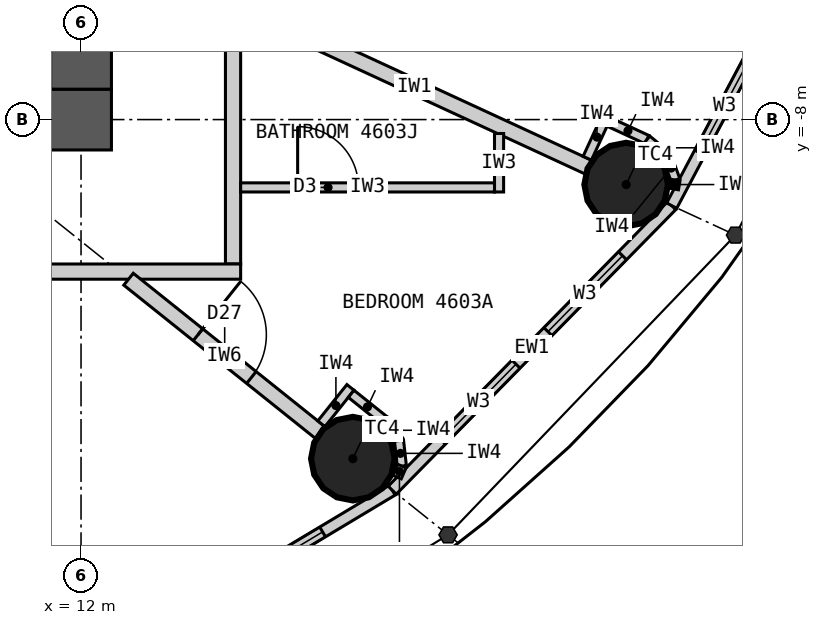
"""IFC4 building model, lengths in metres.
Left out: names, types, materials, properties, quantities, classifications, styles, units other than length and angle.
Written with IfcOpenShell. Run it as: python <this file> out.ifc"""

import sys

from ifc_helpers import new_model, si_unit, direction, frame, frame_2d, origin, origin_2d, place, context, subcontext, project, spatial, rectangle, circle, extrude, element, fill, save


model = new_model("IFC4")
c1 = context("Model", 3, precision=1e-05, world=origin(), true_north=direction((0.0, 1.0)))
c2 = subcontext(c1, "Body", "Model", "MODEL_VIEW")
j1 = project(units=[si_unit("LENGTHUNIT", "METRE"), si_unit("PLANEANGLEUNIT", "RADIAN")], contexts=[c1])
p1 = place(None, origin())
s1 = spatial("IfcSite", under=j1, at=p1, CompositionType="ELEMENT")
p2 = place(p1, origin())
s2 = spatial("IfcBuilding", under=s1, at=p2, CompositionType="ELEMENT")
p3 = place(p2, frame((0.0, 0.0, 173.1)))
s3 = spatial("IfcBuildingStorey", under=s2, at=p3, CompositionType="ELEMENT", Elevation=173.1)
for number, where, z_axis, x_axis in (
    (1, (15.576, -12.461, 0.0), (0.0, 0.0, 1.0), (1.0, 0.0, 0.0)),
    (2, (19.172, -8.855, 0.0), (0.0, 0.0, 1.0), (1.0, 0.0, 0.0)),
):
    element("IfcColumn", number, at=place(p3, frame(where, z_axis=z_axis, x_axis=x_axis)), inside=s3, PredefinedType="COLUMN", context=c2, shape_type="SweptSolid", body=[
        extrude(circle(Radius=0.55, at=origin_2d()), origin(), (0.0, 0.0, 1.0), 3.3),
    ])
p4 = place(p3, frame((12.4, -8.0, 0.0), z_axis=(0.0, 0.0, 1.0), x_axis=(-1.0, 0.0, 0.0)))
e3 = element("IfcWall", 3, at=p4, inside=s3, PredefinedType="SHEAR", context=c2, shape_type="SweptSolid", body=[
    extrude(rectangle(XDim=24.8, YDim=0.8, at=frame_2d((12.4, 0.0))), origin(), (0.0, 0.0, 1.0), 3.3),
])
p5 = place(p4, frame((11.1, 0.0, 0.0)))
e4 = element("IfcOpeningElement", 4, at=p5, cuts=e3, PredefinedType="OPENING", context=c2, shape_type="SweptSolid", body=[
    extrude(rectangle(XDim=1.2, YDim=2.2, at=frame_2d((0.6, 1.1))), frame((0.0, 0.41, 0.0), z_axis=(0.0, -1.0, 0.0), x_axis=(1.0, 0.0, 0.0)), (0.0, 0.0, 1.0), 0.82),
])
p6 = place(p4, frame((18.7, 0.0, 0.0)))
e5 = element("IfcOpeningElement", 5, at=p6, cuts=e3, PredefinedType="OPENING", context=c2, shape_type="SweptSolid", body=[
    extrude(rectangle(XDim=0.9, YDim=2.2, at=frame_2d((0.45, 1.1))), frame((0.0, 0.41, 0.0), z_axis=(0.0, -1.0, 0.0), x_axis=(1.0, 0.0, 0.0)), (0.0, 0.0, 1.0), 0.82),
])
p7 = place(p3, frame((12.0, -7.6, 0.0), z_axis=(0.0, 0.0, 1.0), x_axis=(0.0, 1.0, 0.0)))
e6 = element("IfcWall", 6, at=p7, inside=s3, PredefinedType="SHEAR", context=c2, shape_type="SweptSolid", body=[
    extrude(rectangle(XDim=15.2, YDim=0.8, at=frame_2d((7.6, 0.0))), origin(), (0.0, 0.0, 1.0), 3.3),
])
p8 = place(p7, frame((6.7, 0.0, 0.0)))
e7 = element("IfcOpeningElement", 7, at=p8, cuts=e6, PredefinedType="OPENING", context=c2, shape_type="SweptSolid", body=[
    extrude(rectangle(XDim=1.8, YDim=2.2, at=frame_2d((0.9, 1.1))), frame((0.0, 0.41, 0.0), z_axis=(0.0, -1.0, 0.0), x_axis=(1.0, 0.0, 0.0)), (0.0, 0.0, 1.0), 0.82),
])
p9 = place(p3, frame((11.346, -15.722, 0.0), z_axis=(0.0, 0.0, 1.0), x_axis=(0.857695199231, 0.514158482587, 0.0)))
e8 = element("IfcWall", 8, at=p9, inside=s3, PredefinedType="ELEMENTEDWALL", context=c2, shape_type="SweptSolid", body=[
    extrude(rectangle(XDim=5.536, YDim=0.15, at=frame_2d((2.768, 0.0))), origin(), (0.0, 0.0, 1.0), 3.12),
])
p10 = place(p9, frame((1.068, 0.0, 0.9)))
e9 = element("IfcOpeningElement", 9, at=p10, cuts=e8, PredefinedType="OPENING", context=c2, shape_type="SweptSolid", body=[
    extrude(rectangle(XDim=1.4, YDim=1.9, at=frame_2d((0.7, 0.95))), frame((0.0, 0.085, 0.0), z_axis=(0.0, -1.0, 0.0), x_axis=(1.0, 0.0, 0.0)), (0.0, 0.0, 1.0), 0.17),
])
p11 = place(p9, frame((3.068, 0.0, 0.9)))
e10 = element("IfcOpeningElement", 10, at=p11, cuts=e8, PredefinedType="OPENING", context=c2, shape_type="SweptSolid", body=[
    extrude(rectangle(XDim=1.4, YDim=1.9, at=frame_2d((0.7, 0.95))), frame((0.0, 0.085, 0.0), z_axis=(0.0, -1.0, 0.0), x_axis=(1.0, 0.0, 0.0)), (0.0, 0.0, 1.0), 0.17),
])
p12 = place(p3, frame((16.095, -12.876, 0.0), z_axis=(0.0, 0.0, 1.0), x_axis=(0.700727467776, 0.71342905457, 0.0)))
e11 = element("IfcWall", 11, at=p12, inside=s3, PredefinedType="ELEMENTEDWALL", context=c2, shape_type="SweptSolid", body=[
    extrude(rectangle(XDim=5.247, YDim=0.15, at=frame_2d((2.624, 0.0))), origin(), (0.0, 0.0, 1.0), 3.12),
])
p13 = place(p12, frame((0.924, 0.0, 0.9)))
e12 = element("IfcOpeningElement", 12, at=p13, cuts=e11, PredefinedType="OPENING", context=c2, shape_type="SweptSolid", body=[
    extrude(rectangle(XDim=1.4, YDim=1.9, at=frame_2d((0.7, 0.95))), frame((0.0, 0.085, 0.0), z_axis=(0.0, -1.0, 0.0), x_axis=(1.0, 0.0, 0.0)), (0.0, 0.0, 1.0), 0.17),
])
p14 = place(p12, frame((2.924, 0.0, 0.9)))
e13 = element("IfcOpeningElement", 13, at=p14, cuts=e11, PredefinedType="OPENING", context=c2, shape_type="SweptSolid", body=[
    extrude(rectangle(XDim=1.4, YDim=1.9, at=frame_2d((0.7, 0.95))), frame((0.0, 0.085, 0.0), z_axis=(0.0, -1.0, 0.0), x_axis=(1.0, 0.0, 0.0)), (0.0, 0.0, 1.0), 0.17),
])
p15 = place(p3, frame((19.772, -9.132, 0.0), z_axis=(0.0, 0.0, 1.0), x_axis=(0.468428906714, 0.883501193748, 0.0)))
e14 = element("IfcWall", 14, at=p15, inside=s3, PredefinedType="ELEMENTEDWALL", context=c2, shape_type="SweptSolid", body=[
    extrude(rectangle(XDim=4.974, YDim=0.15, at=frame_2d((2.487, 0.0))), origin(), (0.0, 0.0, 1.0), 3.12),
])
p16 = place(p15, frame((0.787, 0.0, 0.9)))
e15 = element("IfcOpeningElement", 15, at=p16, cuts=e14, PredefinedType="OPENING", context=c2, shape_type="SweptSolid", body=[
    extrude(rectangle(XDim=1.4, YDim=1.9, at=frame_2d((0.7, 0.95))), frame((0.0, 0.085, 0.0), z_axis=(0.0, -1.0, 0.0), x_axis=(1.0, 0.0, 0.0)), (0.0, 0.0, 1.0), 0.17),
])
p17 = place(p15, frame((2.787, 0.0, 0.9)))
e16 = element("IfcOpeningElement", 16, at=p17, cuts=e14, PredefinedType="OPENING", context=c2, shape_type="SweptSolid", body=[
    extrude(rectangle(XDim=1.4, YDim=1.9, at=frame_2d((0.7, 0.95))), frame((0.0, 0.085, 0.0), z_axis=(0.0, -1.0, 0.0), x_axis=(1.0, 0.0, 0.0)), (0.0, 0.0, 1.0), 0.17),
])
p18 = place(p3, frame((14.0, -9.9, 0.0), z_axis=(0.0, 0.0, 1.0), x_axis=(0.0, 1.0, 0.0)))
e17 = element("IfcWall", 17, at=p18, inside=s3, PredefinedType="PARTITIONING", context=c2, shape_type="SweptSolid", body=[
    extrude(rectangle(XDim=19.8, YDim=0.2, at=frame_2d((9.9, 0.0))), origin(), (0.0, 0.0, 1.0), 3.12),
])
p19 = place(p18, frame((3.688, 0.0, 0.0)))
e18 = element("IfcOpeningElement", 18, at=p19, cuts=e17, PredefinedType="OPENING", context=c2, shape_type="SweptSolid", body=[
    extrude(rectangle(XDim=1.0, YDim=2.2, at=frame_2d((0.5, 1.1))), frame((0.0, 0.11, 0.0), z_axis=(0.0, -1.0, 0.0), x_axis=(1.0, 0.0, 0.0)), (0.0, 0.0, 1.0), 0.22),
])
p20 = place(p18, frame((9.979, 0.0, 0.0)))
e19 = element("IfcOpeningElement", 19, at=p20, cuts=e17, PredefinedType="OPENING", context=c2, shape_type="SweptSolid", body=[
    extrude(rectangle(XDim=1.0, YDim=2.2, at=frame_2d((0.5, 1.1))), frame((0.0, 0.11, 0.0), z_axis=(0.0, -1.0, 0.0), x_axis=(1.0, 0.0, 0.0)), (0.0, 0.0, 1.0), 0.22),
])
p21 = place(p18, frame((17.122, 0.0, 0.0)))
e20 = element("IfcOpeningElement", 20, at=p21, cuts=e17, PredefinedType="OPENING", context=c2, shape_type="SweptSolid", body=[
    extrude(rectangle(XDim=1.0, YDim=2.2, at=frame_2d((0.5, 1.1))), frame((0.0, 0.11, 0.0), z_axis=(0.0, -1.0, 0.0), x_axis=(1.0, 0.0, 0.0)), (0.0, 0.0, 1.0), 0.22),
])
p22 = place(p3, frame((14.1, -10.0, 0.0), z_axis=(0.0, 0.0, 1.0), x_axis=(-1.0, 0.0, 0.0)))
e21 = element("IfcWall", 21, at=p22, inside=s3, PredefinedType="PARTITIONING", context=c2, shape_type="SweptSolid", body=[
    extrude(rectangle(XDim=28.2, YDim=0.2, at=frame_2d((14.1, 0.0))), origin(), (0.0, 0.0, 1.0), 3.12),
])
p23 = place(p22, frame((23.165, 0.0, 0.0)))
e22 = element("IfcOpeningElement", 22, at=p23, cuts=e21, PredefinedType="OPENING", context=c2, shape_type="SweptSolid", body=[
    extrude(rectangle(XDim=1.0, YDim=2.2, at=frame_2d((0.5, 1.1))), frame((0.0, 0.11, 0.0), z_axis=(0.0, -1.0, 0.0), x_axis=(1.0, 0.0, 0.0)), (0.0, 0.0, 1.0), 0.22),
])
p24 = place(p22, frame((13.923, 0.0, 0.0)))
e23 = element("IfcOpeningElement", 23, at=p24, cuts=e21, PredefinedType="OPENING", context=c2, shape_type="SweptSolid", body=[
    extrude(rectangle(XDim=1.0, YDim=2.2, at=frame_2d((0.5, 1.1))), frame((0.0, 0.11, 0.0), z_axis=(0.0, -1.0, 0.0), x_axis=(1.0, 0.0, 0.0)), (0.0, 0.0, 1.0), 0.22),
])
p25 = place(p22, frame((7.957, 0.0, 0.0)))
e24 = element("IfcOpeningElement", 24, at=p25, cuts=e21, PredefinedType="OPENING", context=c2, shape_type="SweptSolid", body=[
    extrude(rectangle(XDim=1.0, YDim=2.2, at=frame_2d((0.5, 1.1))), frame((0.0, 0.11, 0.0), z_axis=(0.0, -1.0, 0.0), x_axis=(1.0, 0.0, 0.0)), (0.0, 0.0, 1.0), 0.22),
])
p26 = place(p3, frame((12.625, -10.1, 0.0), z_axis=(0.0, 0.0, 1.0), x_axis=(0.780876185034, -0.624685827954, 0.0)))
e25 = element("IfcWall", 25, at=p26, inside=s3, PredefinedType="PARTITIONING", context=c2, shape_type="SweptSolid", body=[
    extrude(rectangle(XDim=3.229, YDim=0.2, at=frame_2d((1.615, 0.0))), origin(), (0.0, 0.0, 1.0), 2.42),
])
p27 = place(p26, frame((1.17, 0.0, 0.0)))
e26 = element("IfcOpeningElement", 26, at=p27, cuts=e25, PredefinedType="OPENING", context=c2, shape_type="SweptSolid", body=[
    extrude(rectangle(XDim=0.9, YDim=2.1, at=frame_2d((0.45, 1.05))), frame((0.0, 0.11, 0.0), z_axis=(0.0, -1.0, 0.0), x_axis=(1.0, 0.0, 0.0)), (0.0, 0.0, 1.0), 0.22),
])
p28 = place(p3, frame((14.1, -6.512, 0.0), z_axis=(0.0, 0.0, 1.0), x_axis=(0.907823150669, -0.419353224751, 0.0)))
e27 = element("IfcWall", 27, at=p28, inside=s3, PredefinedType="PARTITIONING", context=c2, shape_type="SweptSolid", body=[
    extrude(rectangle(XDim=5.037, YDim=0.2, at=frame_2d((2.519, 0.0))), origin(), (0.0, 0.0, 1.0), 2.32),
])
p29 = place(p3, frame((17.5, -8.183, 0.0), z_axis=(0.0, 0.0, 1.0), x_axis=(0.0, -1.0, 0.0)))
e28 = element("IfcWall", 28, at=p29, inside=s3, PredefinedType="PARTITIONING", context=c2, shape_type="SweptSolid", body=[
    extrude(rectangle(XDim=0.77, YDim=0.12, at=frame_2d((0.385, 0.0))), origin(), (0.0, 0.0, 1.0), 3.12),
])
p30 = place(p3, frame((14.1, -8.893, 0.0), z_axis=(0.0, 0.0, 1.0), x_axis=(1.0, 0.0, 0.0)))
e29 = element("IfcWall", 29, at=p30, inside=s3, PredefinedType="PARTITIONING", context=c2, shape_type="SweptSolid", body=[
    extrude(rectangle(XDim=3.34, YDim=0.12, at=frame_2d((1.67, 0.0))), origin(), (0.0, 0.0, 1.0), 3.12),
])
p31 = place(p30, frame((0.75, 0.0, 0.0)))
e30 = element("IfcOpeningElement", 30, at=p31, cuts=e29, PredefinedType="OPENING", context=c2, shape_type="SweptSolid", body=[
    extrude(rectangle(XDim=0.8, YDim=2.1, at=frame_2d((0.4, 1.05))), frame((0.0, 0.07, 0.0), z_axis=(0.0, -1.0, 0.0), x_axis=(1.0, 0.0, 0.0)), (0.0, 0.0, 1.0), 0.14),
])
p32 = place(p3, frame((15.162, -12.002, 0.0), z_axis=(0.0, 0.0, 1.0), x_axis=(0.624597762427, 0.780946627607, 0.0)))
e31 = element("IfcWall", 31, at=p32, inside=s3, PredefinedType="PARTITIONING", context=c2, shape_type="SweptSolid", body=[
    extrude(rectangle(XDim=0.612, YDim=0.12, at=frame_2d((0.306, 0.0))), origin(), (0.0, 0.0, 1.0), 3.12),
])
p33 = place(p3, frame((15.554, -11.608, 0.0), z_axis=(0.0, 0.0, 1.0), x_axis=(0.780695577787, -0.624911525597, 0.0)))
e32 = element("IfcWall", 32, at=p33, inside=s3, PredefinedType="PARTITIONING", context=c2, shape_type="SweptSolid", body=[
    extrude(rectangle(XDim=0.55, YDim=0.12, at=frame_2d((0.275, 0.0))), origin(), (0.0, 0.0, 1.0), 3.12),
])
p34 = place(p3, frame((15.984, -11.952, 0.0), z_axis=(0.0, 0.0, 1.0), x_axis=(0.592335221171, -0.805691619517, 0.0)))
e33 = element("IfcWall", 33, at=p34, inside=s3, PredefinedType="PARTITIONING", context=c2, shape_type="SweptSolid", body=[
    extrude(rectangle(XDim=0.338, YDim=0.12, at=frame_2d((0.169, 0.0))), origin(), (0.0, 0.0, 1.0), 3.12),
])
p35 = place(p3, frame((16.184, -12.224, 0.0), z_axis=(0.0, 0.0, 1.0), x_axis=(0.110669692975, -0.993857242795, 0.0)))
e34 = element("IfcWall", 34, at=p35, inside=s3, PredefinedType="PARTITIONING", context=c2, shape_type="SweptSolid", body=[
    extrude(rectangle(XDim=0.337, YDim=0.12, at=frame_2d((0.169, 0.0))), origin(), (0.0, 0.0, 1.0), 3.12),
])
p36 = place(p3, frame((16.221, -12.559, 0.0), z_axis=(0.0, 0.0, 1.0), x_axis=(-0.401064416249, -0.916049853457, 0.0)))
e35 = element("IfcWall", 35, at=p36, inside=s3, PredefinedType="PARTITIONING", context=c2, shape_type="SweptSolid", body=[
    extrude(rectangle(XDim=0.156, YDim=0.12, at=frame_2d((0.078, 0.0))), origin(), (0.0, 0.0, 1.0), 3.12),
])
p37 = place(p3, frame((18.66, -8.509, 0.0), z_axis=(0.0, 0.0, 1.0), x_axis=(0.419083463716, 0.907947713494, 0.0)))
e36 = element("IfcWall", 36, at=p37, inside=s3, PredefinedType="PARTITIONING", context=c2, shape_type="SweptSolid", body=[
    extrude(rectangle(XDim=0.612, YDim=0.12, at=frame_2d((0.306, 0.0))), origin(), (0.0, 0.0, 1.0), 3.12),
])
p38 = place(p3, frame((18.946, -8.032, 0.0), z_axis=(0.0, 0.0, 1.0), x_axis=(0.907842467956, -0.419311403822, 0.0)))
e37 = element("IfcWall", 37, at=p38, inside=s3, PredefinedType="PARTITIONING", context=c2, shape_type="SweptSolid", body=[
    extrude(rectangle(XDim=0.55, YDim=0.12, at=frame_2d((0.275, 0.0))), origin(), (0.0, 0.0, 1.0), 3.12),
])
p39 = place(p3, frame((19.446, -8.263, 0.0), z_axis=(0.0, 0.0, 1.0), x_axis=(0.768221279597, -0.640184399664, 0.0)))
e38 = element("IfcWall", 38, at=p39, inside=s3, PredefinedType="PARTITIONING", context=c2, shape_type="SweptSolid", body=[
    extrude(rectangle(XDim=0.337, YDim=0.12, at=frame_2d((0.169, 0.0))), origin(), (0.0, 0.0, 1.0), 3.12),
])
p40 = place(p3, frame((19.705, -8.479, 0.0), z_axis=(0.0, 0.0, 1.0), x_axis=(0.345571344575, -0.938392479621, 0.0)))
e39 = element("IfcWall", 39, at=p40, inside=s3, PredefinedType="PARTITIONING", context=c2, shape_type="SweptSolid", body=[
    extrude(rectangle(XDim=0.338, YDim=0.12, at=frame_2d((0.169, 0.0))), origin(), (0.0, 0.0, 1.0), 3.12),
])
p41 = place(p3, frame((19.822, -8.796, 0.0), z_axis=(0.0, 0.0, 1.0), x_axis=(-0.169701508781, -0.985495508827, 0.0)))
e40 = element("IfcWall", 40, at=p41, inside=s3, PredefinedType="PARTITIONING", context=c2, shape_type="SweptSolid", body=[
    extrude(rectangle(XDim=0.119, YDim=0.12, at=frame_2d((0.06, 0.0))), origin(), (0.0, 0.0, 1.0), 3.12),
])
p42 = place(p11, origin())
e41 = element("IfcWindow", 41, at=p42, inside=s3, PartitioningType="SINGLE_PANEL", PredefinedType="WINDOW", context=c2, shape_type="SweptSolid", body=[
    extrude(rectangle(XDim=1.4, YDim=1.9, at=frame_2d((0.7, 0.95))), frame((0.0, 0.03, 0.0), z_axis=(0.0, -1.0, 0.0), x_axis=(1.0, 0.0, 0.0)), (0.0, 0.0, 1.0), 0.06),
])
fill(e10, e41)
p43 = place(p13, origin())
e42 = element("IfcWindow", 42, at=p43, inside=s3, PartitioningType="SINGLE_PANEL", PredefinedType="WINDOW", context=c2, shape_type="SweptSolid", body=[
    extrude(rectangle(XDim=1.4, YDim=1.9, at=frame_2d((0.7, 0.95))), frame((0.0, 0.03, 0.0), z_axis=(0.0, -1.0, 0.0), x_axis=(1.0, 0.0, 0.0)), (0.0, 0.0, 1.0), 0.06),
])
fill(e12, e42)
p44 = place(p14, origin())
e43 = element("IfcWindow", 43, at=p44, inside=s3, PartitioningType="SINGLE_PANEL", PredefinedType="WINDOW", context=c2, shape_type="SweptSolid", body=[
    extrude(rectangle(XDim=1.4, YDim=1.9, at=frame_2d((0.7, 0.95))), frame((0.0, 0.03, 0.0), z_axis=(0.0, -1.0, 0.0), x_axis=(1.0, 0.0, 0.0)), (0.0, 0.0, 1.0), 0.06),
])
fill(e13, e43)
p45 = place(p16, origin())
e44 = element("IfcWindow", 44, at=p45, inside=s3, PartitioningType="SINGLE_PANEL", PredefinedType="WINDOW", context=c2, shape_type="SweptSolid", body=[
    extrude(rectangle(XDim=1.4, YDim=1.9, at=frame_2d((0.7, 0.95))), frame((0.0, 0.03, 0.0), z_axis=(0.0, -1.0, 0.0), x_axis=(1.0, 0.0, 0.0)), (0.0, 0.0, 1.0), 0.06),
])
fill(e15, e44)
p46 = place(p31, origin())
e45 = element("IfcDoor", 45, at=p46, inside=s3, OperationType="SINGLE_SWING_LEFT", PredefinedType="DOOR", context=c2, shape_type="SweptSolid", body=[
    extrude(rectangle(XDim=0.8, YDim=2.1, at=frame_2d((0.4, 1.05))), frame((0.0, 0.025, 0.0), z_axis=(0.0, -1.0, 0.0), x_axis=(1.0, 0.0, 0.0)), (0.0, 0.0, 1.0), 0.05),
])
fill(e30, e45)
p47 = place(p27, origin())
e46 = element("IfcDoor", 46, at=p47, inside=s3, OperationType="SINGLE_SWING_LEFT", PredefinedType="DOOR", context=c2, shape_type="SweptSolid", body=[
    extrude(rectangle(XDim=0.9, YDim=2.1, at=frame_2d((0.45, 1.05))), frame((0.0, 0.025, 0.0), z_axis=(0.0, -1.0, 0.0), x_axis=(1.0, 0.0, 0.0)), (0.0, 0.0, 1.0), 0.05),
])
fill(e26, e46)
save(model, sys.argv[1])
